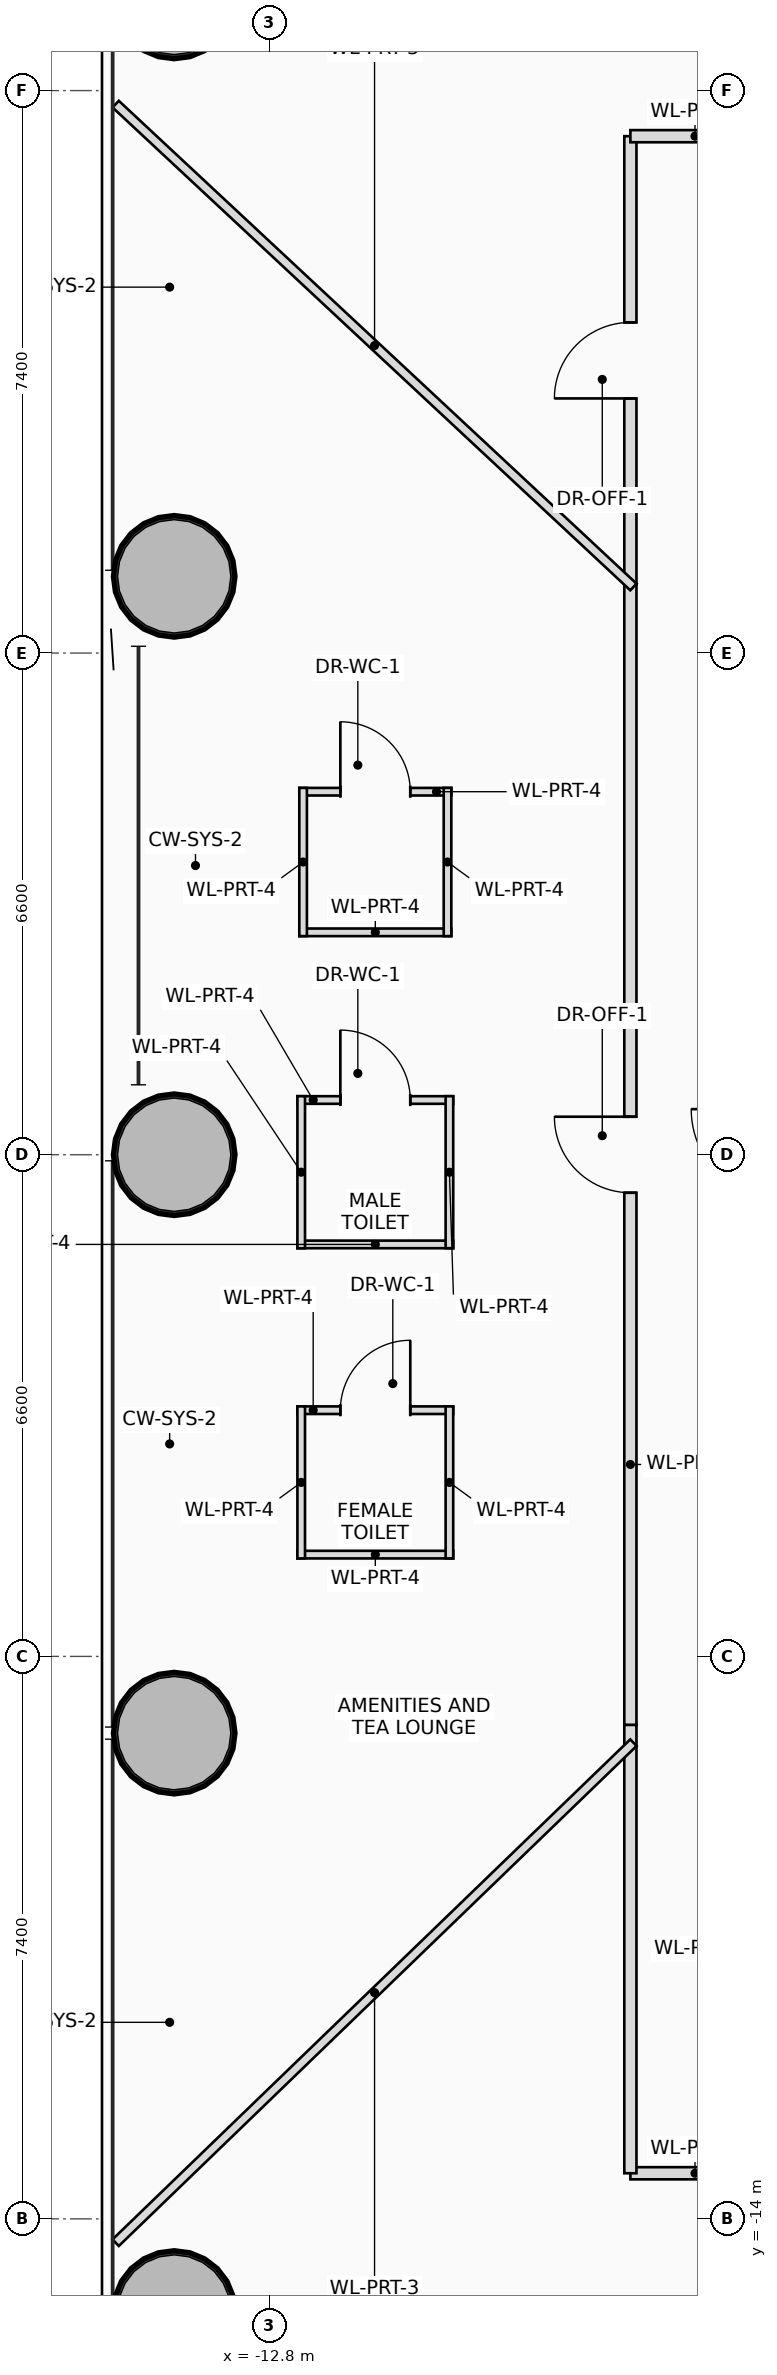
"""IFC4 building model, lengths in metres.
Left out: names, types, materials, properties, quantities, classifications, styles, units other than length and angle.
Written with IfcOpenShell. Run it as: python <this file> out.ifc"""

import sys

from ifc_helpers import new_model, si_unit, direction, frame, frame_2d, origin, origin_2d, place, context, subcontext, project, spatial, rectangle, hollow_circle, extrude, source, transform, mapped, element, fill, save


model = new_model("IFC4")
c1 = context("Model", 3, precision=1e-05, world=origin(), true_north=direction((0.0, 1.0)))
c2 = subcontext(c1, "Body", "Model", "MODEL_VIEW")
j1 = project(units=[si_unit("LENGTHUNIT", "METRE"), si_unit("PLANEANGLEUNIT", "RADIAN")], contexts=[c1])
p1 = place(None, origin())
s1 = spatial("IfcSite", under=j1, at=p1, CompositionType="ELEMENT")
p2 = place(p1, origin())
s2 = spatial("IfcBuilding", under=s1, at=p2, CompositionType="ELEMENT")
p3 = place(p2, frame((0.0, 0.0, 27.5)))
s3 = spatial("IfcBuildingStorey", under=s2, at=p3, CompositionType="ELEMENT", Elevation=27.5)
m1 = source(origin(), c2, "Body", "SweptSolid", [
    extrude(hollow_circle(Radius=0.8, WallThickness=0.055, at=origin_2d()), origin(), (0.0, 0.0, 1.0), 3.7),
])
for number, where, z_axis, x_axis in (
    (1, (-14.052, 15.219, 0.0), (0.0, 0.0, 1.0), (1.0, 0.0, 0.0)),
    (2, (-14.052, 7.61, 0.0), (0.0, 0.0, 1.0), (1.0, 0.0, 0.0)),
    (3, (-14.052, 0.0, 0.0), (0.0, 0.0, 1.0), (1.0, 0.0, 0.0)),
    (4, (-14.052, -7.61, 0.0), (0.0, 0.0, 1.0), (1.0, 0.0, 0.0)),
    (5, (-14.052, -15.219, 0.0), (0.0, 0.0, 1.0), (1.0, 0.0, 0.0)),
):
    element("IfcColumn", number, at=place(p3, frame(where, z_axis=z_axis, x_axis=x_axis)), inside=s3, PredefinedType="COLUMN", context=c2, shape_type="MappedRepresentation", body=[
        mapped(m1, transform((0.0, 0.0, 0.0), scale=1.0)),
    ])
p4 = place(p3, frame((-12.431, 0.72, 0.0), z_axis=(0.0, 0.0, 1.0), x_axis=(1.0, 0.0, 0.0)))
e6 = element("IfcWall", 6, at=p4, inside=s3, PredefinedType="PARTITIONING", context=c2, shape_type="SweptSolid", body=[
    extrude(rectangle(XDim=2.05, YDim=0.1, at=frame_2d((1.025, 0.0))), origin(), (0.0, 0.0, 1.0), 3.15),
])
p5 = place(p4, frame((0.565, 0.0, 0.0)))
e7 = element("IfcOpeningElement", 7, at=p5, cuts=e6, PredefinedType="OPENING", context=c2, shape_type="SweptSolid", body=[
    extrude(rectangle(XDim=0.92, YDim=2.1, at=frame_2d((0.46, 1.05))), frame((0.0, 0.06, 0.0), z_axis=(0.0, -1.0, 0.0), x_axis=(1.0, 0.0, 0.0)), (0.0, 0.0, 1.0), 0.12),
])
p6 = place(p3, frame((-10.381, -1.18, 0.0), z_axis=(0.0, 0.0, 1.0), x_axis=(-1.0, 0.0, 0.0)))
e8 = element("IfcWall", 8, at=p6, inside=s3, PredefinedType="PARTITIONING", context=c2, shape_type="SweptSolid", body=[
    extrude(rectangle(XDim=2.05, YDim=0.1, at=frame_2d((1.025, 0.0))), origin(), (0.0, 0.0, 1.0), 2.8),
])
p7 = place(p3, frame((-10.431, 0.77, 0.0), z_axis=(0.0, 0.0, 1.0), x_axis=(0.0, -1.0, 0.0)))
e9 = element("IfcWall", 9, at=p7, inside=s3, PredefinedType="PARTITIONING", context=c2, shape_type="SweptSolid", body=[
    extrude(rectangle(XDim=2.0, YDim=0.1, at=frame_2d((1.0, 0.0))), origin(), (0.0, 0.0, 1.0), 3.495),
])
p8 = place(p3, frame((-12.381, -1.23, 0.0), z_axis=(0.0, 0.0, 1.0), x_axis=(0.0, 1.0, 0.0)))
e10 = element("IfcWall", 10, at=p8, inside=s3, PredefinedType="PARTITIONING", context=c2, shape_type="SweptSolid", body=[
    extrude(rectangle(XDim=2.0, YDim=0.1, at=frame_2d((1.0, 0.0))), origin(), (0.0, 0.0, 1.0), 2.8),
])
p9 = place(p3, frame((-12.431, -3.361, 0.0), z_axis=(0.0, 0.0, 1.0), x_axis=(1.0, 0.0, 0.0)))
e11 = element("IfcWall", 11, at=p9, inside=s3, PredefinedType="PARTITIONING", context=c2, shape_type="SweptSolid", body=[
    extrude(rectangle(XDim=2.05, YDim=0.1, at=frame_2d((1.025, 0.0))), origin(), (0.0, 0.0, 1.0), 3.15),
])
p10 = place(p9, frame((0.565, 0.0, 0.0)))
e12 = element("IfcOpeningElement", 12, at=p10, cuts=e11, PredefinedType="OPENING", context=c2, shape_type="SweptSolid", body=[
    extrude(rectangle(XDim=0.92, YDim=2.1, at=frame_2d((0.46, 1.05))), frame((0.0, 0.06, 0.0), z_axis=(0.0, -1.0, 0.0), x_axis=(1.0, 0.0, 0.0)), (0.0, 0.0, 1.0), 0.12),
])
p11 = place(p3, frame((-10.381, -5.261, 0.0), z_axis=(0.0, 0.0, 1.0), x_axis=(-1.0, 0.0, 0.0)))
e13 = element("IfcWall", 13, at=p11, inside=s3, PredefinedType="PARTITIONING", context=c2, shape_type="SweptSolid", body=[
    extrude(rectangle(XDim=2.05, YDim=0.1, at=frame_2d((1.025, 0.0))), origin(), (0.0, 0.0, 1.0), 3.15),
])
for number, where, z_axis, x_axis in (
    (14, (-10.431, -3.311, 0.0), (0.0, 0.0, 1.0), (0.0, -1.0, 0.0)),
    (15, (-12.381, -5.311, 0.0), (0.0, 0.0, 1.0), (0.0, 1.0, 0.0)),
):
    element("IfcWall", number, at=place(p3, frame(where, z_axis=z_axis, x_axis=x_axis)), inside=s3, PredefinedType="PARTITIONING", context=c2, shape_type="SweptSolid", body=[
        extrude(rectangle(XDim=2.0, YDim=0.1, at=frame_2d((1.0, 0.0))), origin(), (0.0, 0.0, 1.0), 3.495),
    ])
p12 = place(p3, frame((-12.406, 4.776, 0.0), z_axis=(0.0, 0.0, 1.0), x_axis=(1.0, 0.0, 0.0)))
e16 = element("IfcWall", 16, at=p12, inside=s3, PredefinedType="PARTITIONING", context=c2, shape_type="SweptSolid", body=[
    extrude(rectangle(XDim=2.0, YDim=0.1, at=frame_2d((1.0, 0.0))), origin(), (0.0, 0.0, 1.0), 3.15),
])
p13 = place(p12, frame((0.54, 0.0, 0.0)))
e17 = element("IfcOpeningElement", 17, at=p13, cuts=e16, PredefinedType="OPENING", context=c2, shape_type="SweptSolid", body=[
    extrude(rectangle(XDim=0.92, YDim=2.1, at=frame_2d((0.46, 1.05))), frame((0.0, 0.06, 0.0), z_axis=(0.0, -1.0, 0.0), x_axis=(1.0, 0.0, 0.0)), (0.0, 0.0, 1.0), 0.12),
])
p14 = place(p3, frame((-10.406, 2.926, 0.0), z_axis=(0.0, 0.0, 1.0), x_axis=(-1.0, 0.0, 0.0)))
e18 = element("IfcWall", 18, at=p14, inside=s3, PredefinedType="PARTITIONING", context=c2, shape_type="SweptSolid", body=[
    extrude(rectangle(XDim=2.0, YDim=0.1, at=frame_2d((1.0, 0.0))), origin(), (0.0, 0.0, 1.0), 3.15),
])
for number, where, z_axis, x_axis in (
    (19, (-10.456, 4.826, 0.0), (0.0, 0.0, 1.0), (0.0, -1.0, 0.0)),
    (20, (-12.356, 2.876, 0.0), (0.0, 0.0, 1.0), (0.0, 1.0, 0.0)),
):
    element("IfcWall", number, at=place(p3, frame(where, z_axis=z_axis, x_axis=x_axis)), inside=s3, PredefinedType="PARTITIONING", context=c2, shape_type="SweptSolid", body=[
        extrude(rectangle(XDim=1.95, YDim=0.1, at=frame_2d((0.975, 0.0))), origin(), (0.0, 0.0, 1.0), 3.495),
    ])
p15 = place(p3, frame((-6.35, -13.4, 0.0), z_axis=(0.0, 0.0, 1.0), x_axis=(-1.0, 0.0, 0.0)))
e21 = element("IfcWall", 21, at=p15, inside=s3, PredefinedType="PARTITIONING", context=c2, shape_type="SweptSolid", body=[
    extrude(rectangle(XDim=1.7, YDim=0.16, at=frame_2d((0.85, 0.0))), origin(), (0.0, 0.0, 1.0), 2.8),
])
p16 = place(p3, frame((-8.05, -13.4, 0.0), z_axis=(0.0, 0.0, 1.0), x_axis=(0.0, 1.0, 0.0)))
e22 = element("IfcWall", 22, at=p16, inside=s3, PredefinedType="PARTITIONING", context=c2, shape_type="SweptSolid", body=[
    extrude(rectangle(XDim=5.9, YDim=0.16, at=frame_2d((2.95, 0.0))), origin(), (0.0, 0.0, 1.0), 2.8),
])
p17 = place(p3, frame((-8.05, -7.5, 0.0), z_axis=(0.0, 0.0, 1.0), x_axis=(0.0, 1.0, 0.0)))
e23 = element("IfcWall", 23, at=p17, inside=s3, PredefinedType="PARTITIONING", context=c2, shape_type="SweptSolid", body=[
    extrude(rectangle(XDim=15.0, YDim=0.16, at=frame_2d((7.5, 0.0))), origin(), (0.0, 0.0, 1.0), 2.8),
])
p18 = place(p17, frame((7.0, 0.0, 0.0)))
e24 = element("IfcOpeningElement", 24, at=p18, cuts=e23, PredefinedType="OPENING", context=c2, shape_type="SweptSolid", body=[
    extrude(rectangle(XDim=1.0, YDim=2.25, at=frame_2d((0.5, 1.125))), frame((0.0, 0.09, 0.0), z_axis=(0.0, -1.0, 0.0), x_axis=(1.0, 0.0, 0.0)), (0.0, 0.0, 1.0), 0.18),
])
p19 = place(p3, frame((-8.05, 7.5, 0.0), z_axis=(0.0, 0.0, 1.0), x_axis=(0.0, 1.0, 0.0)))
e25 = element("IfcWall", 25, at=p19, inside=s3, PredefinedType="PARTITIONING", context=c2, shape_type="SweptSolid", body=[
    extrude(rectangle(XDim=5.9, YDim=0.16, at=frame_2d((2.95, 0.0))), origin(), (0.0, 0.0, 1.0), 2.8),
])
p20 = place(p19, frame((2.45, 0.0, 0.0)))
e26 = element("IfcOpeningElement", 26, at=p20, cuts=e25, PredefinedType="OPENING", context=c2, shape_type="SweptSolid", body=[
    extrude(rectangle(XDim=1.0, YDim=2.25, at=frame_2d((0.5, 1.125))), frame((0.0, 0.09, 0.0), z_axis=(0.0, -1.0, 0.0), x_axis=(1.0, 0.0, 0.0)), (0.0, 0.0, 1.0), 0.18),
])
p21 = place(p3, frame((-8.05, 13.4, 0.0), z_axis=(0.0, 0.0, 1.0), x_axis=(1.0, 0.0, 0.0)))
e27 = element("IfcWall", 27, at=p21, inside=s3, PredefinedType="PARTITIONING", context=c2, shape_type="SweptSolid", body=[
    extrude(rectangle(XDim=1.7, YDim=0.16, at=frame_2d((0.85, 0.0))), origin(), (0.0, 0.0, 1.0), 2.8),
])
p22 = place(p3, frame((-8.01, 7.469, 0.0), z_axis=(0.0, 0.0, 1.0), x_axis=(-0.731354171407, 0.681997856277, 0.0)))
e28 = element("IfcWall", 28, at=p22, inside=s3, PredefinedType="PARTITIONING", context=c2, shape_type="SweptSolid", body=[
    extrude(rectangle(XDim=9.314, YDim=0.12, at=frame_2d((4.657, 0.0))), origin(), (0.0, 0.0, 1.0), 2.96),
])
p23 = place(p3, frame((-8.01, -7.735, 0.0), z_axis=(0.0, 0.0, 1.0), x_axis=(-0.719335268178, -0.694663063618, 0.0)))
e29 = element("IfcWall", 29, at=p23, inside=s3, PredefinedType="PARTITIONING", context=c2, shape_type="SweptSolid", body=[
    extrude(rectangle(XDim=9.47, YDim=0.12, at=frame_2d((4.735, 0.0))), origin(), (0.0, 0.0, 1.0), 2.8),
])
p24 = place(p5, origin())
e30 = element("IfcDoor", 30, at=p24, inside=s3, OperationType="SINGLE_SWING_LEFT", PredefinedType="DOOR", context=c2, shape_type="SweptSolid", body=[
    extrude(rectangle(XDim=0.92, YDim=2.1, at=frame_2d((0.46, 1.05))), frame((0.0, 0.025, 0.0), z_axis=(0.0, -1.0, 0.0), x_axis=(1.0, 0.0, 0.0)), (0.0, 0.0, 1.0), 0.05),
])
fill(e7, e30)
p25 = place(p10, origin())
e31 = element("IfcDoor", 31, at=p25, inside=s3, OperationType="SINGLE_SWING_RIGHT", PredefinedType="DOOR", context=c2, shape_type="SweptSolid", body=[
    extrude(rectangle(XDim=0.92, YDim=2.1, at=frame_2d((0.46, 1.05))), frame((0.0, 0.025, 0.0), z_axis=(0.0, -1.0, 0.0), x_axis=(1.0, 0.0, 0.0)), (0.0, 0.0, 1.0), 0.05),
])
fill(e12, e31)
p26 = place(p13, origin())
e32 = element("IfcDoor", 32, at=p26, inside=s3, OperationType="SINGLE_SWING_LEFT", PredefinedType="DOOR", context=c2, shape_type="SweptSolid", body=[
    extrude(rectangle(XDim=0.92, YDim=2.1, at=frame_2d((0.46, 1.05))), frame((0.0, 0.025, 0.0), z_axis=(0.0, -1.0, 0.0), x_axis=(1.0, 0.0, 0.0)), (0.0, 0.0, 1.0), 0.05),
])
fill(e17, e32)
p27 = place(p18, origin())
e33 = element("IfcDoor", 33, at=p27, inside=s3, OperationType="SINGLE_SWING_RIGHT", PredefinedType="DOOR", context=c2, shape_type="SweptSolid", body=[
    extrude(rectangle(XDim=1.0, YDim=2.25, at=frame_2d((0.5, 1.125))), frame((0.0, 0.025, 0.0), z_axis=(0.0, -1.0, 0.0), x_axis=(1.0, 0.0, 0.0)), (0.0, 0.0, 1.0), 0.05),
])
fill(e24, e33)
p28 = place(p20, origin())
e34 = element("IfcDoor", 34, at=p28, inside=s3, OperationType="SINGLE_SWING_LEFT", PredefinedType="DOOR", context=c2, shape_type="SweptSolid", body=[
    extrude(rectangle(XDim=1.0, YDim=2.25, at=frame_2d((0.5, 1.125))), frame((0.0, 0.025, 0.0), z_axis=(0.0, -1.0, 0.0), x_axis=(1.0, 0.0, 0.0)), (0.0, 0.0, 1.0), 0.05),
])
fill(e26, e34)
save(model, sys.argv[1])
